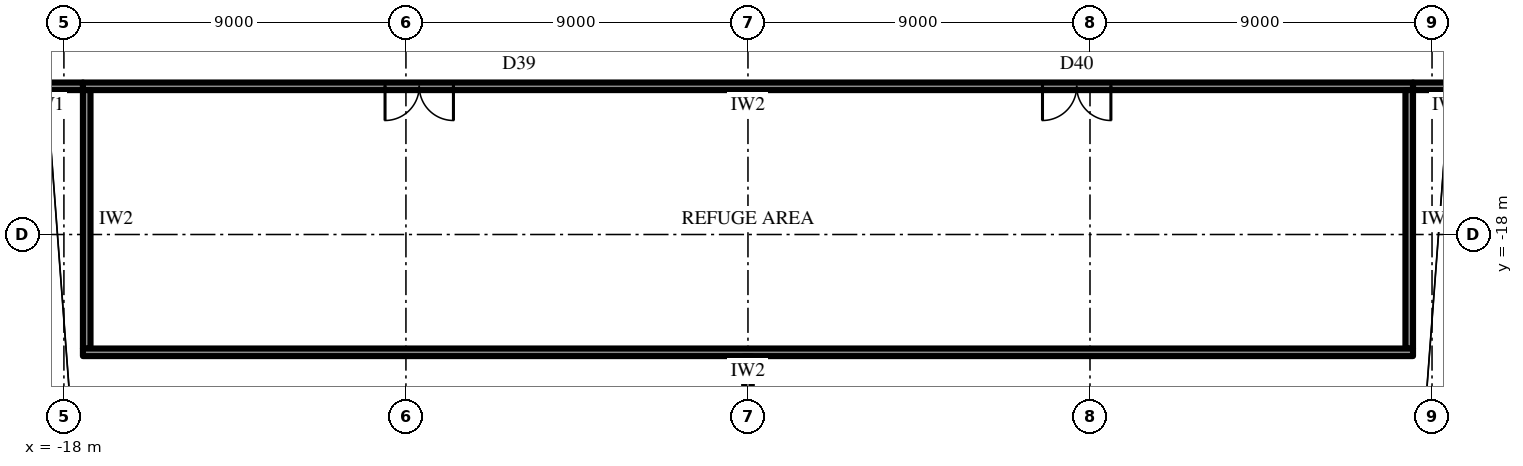
"""IFC4 building model, lengths in metres.
Left out: names, types, materials, properties, quantities, classifications, styles, units other than length and angle.
Written with IfcOpenShell. Run it as: python <this file> out.ifc"""

import sys

from ifc_helpers import new_model, si_unit, direction, frame, frame_2d, origin, place, context, subcontext, project, spatial, rectangle, extrude, element, fill, save


model = new_model("IFC4")
c1 = context("Model", 3, precision=1e-05, world=origin(), true_north=direction((0.0, 1.0)))
c2 = subcontext(c1, "Body", "Model", "MODEL_VIEW")
j1 = project(units=[si_unit("LENGTHUNIT", "METRE"), si_unit("PLANEANGLEUNIT", "RADIAN")], contexts=[c1])
p1 = place(None, origin())
s1 = spatial("IfcSite", under=j1, at=p1, CompositionType="ELEMENT")
p2 = place(p1, origin())
s2 = spatial("IfcBuilding", under=s1, at=p2, CompositionType="ELEMENT")
p3 = place(p2, frame((0.0, 0.0, 203.5)))
s3 = spatial("IfcBuildingStorey", under=s2, at=p3, CompositionType="ELEMENT", Elevation=203.5)
p4 = place(p3, frame((17.5, -14.1, 0.0), z_axis=(0.0, 0.0, 1.0), x_axis=(-1.0, 0.0, 0.0)))
e1 = element("IfcWall", 1, at=p4, inside=s3, PredefinedType="PARTITIONING", context=c2, shape_type="SweptSolid", body=[
    extrude(rectangle(XDim=35.0, YDim=0.2, at=frame_2d((17.5, 0.0))), origin(), (0.0, 0.0, 1.0), 6.7),
])
p5 = place(p4, frame((25.25, 0.0, 0.0)))
e2 = element("IfcOpeningElement", 2, at=p5, cuts=e1, PredefinedType="OPENING", context=c2, shape_type="SweptSolid", body=[
    extrude(rectangle(XDim=1.8, YDim=2.2, at=frame_2d((0.9, 1.1))), frame((0.0, 0.11, 0.0), z_axis=(0.0, -1.0, 0.0), x_axis=(1.0, 0.0, 0.0)), (0.0, 0.0, 1.0), 0.22),
])
p6 = place(p4, frame((7.95, 0.0, 0.0)))
e3 = element("IfcOpeningElement", 3, at=p6, cuts=e1, PredefinedType="OPENING", context=c2, shape_type="SweptSolid", body=[
    extrude(rectangle(XDim=1.8, YDim=2.2, at=frame_2d((0.9, 1.1))), frame((0.0, 0.11, 0.0), z_axis=(0.0, -1.0, 0.0), x_axis=(1.0, 0.0, 0.0)), (0.0, 0.0, 1.0), 0.22),
])
for number, where, z_axis, x_axis in (
    (4, (17.4, -14.2, 0.0), (0.0, 0.0, 1.0), (0.0, -1.0, 0.0)),
    (5, (-17.4, -14.2, 0.0), (0.0, 0.0, 1.0), (0.0, -1.0, 0.0)),
):
    element("IfcWall", number, at=place(p3, frame(where, z_axis=z_axis, x_axis=x_axis)), inside=s3, PredefinedType="PARTITIONING", context=c2, shape_type="SweptSolid", body=[
        extrude(rectangle(XDim=6.8, YDim=0.2, at=frame_2d((3.4, 0.0))), origin(), (0.0, 0.0, 1.0), 6.7),
    ])
p7 = place(p3, frame((17.5, -21.1, 0.0), z_axis=(0.0, 0.0, 1.0), x_axis=(-1.0, 0.0, 0.0)))
e6 = element("IfcWall", 6, at=p7, inside=s3, PredefinedType="PARTITIONING", context=c2, shape_type="SweptSolid", body=[
    extrude(rectangle(XDim=35.0, YDim=0.2, at=frame_2d((17.5, 0.0))), origin(), (0.0, 0.0, 1.0), 6.7),
])
for number, where, z_axis, x_axis in (
    (7, (-17.5, -14.1, 0.0), (0.0, 0.0, 1.0), (-1.0, 0.0, 0.0)),
    (8, (19.4, -14.1, 0.0), (0.0, 0.0, 1.0), (-1.0, 0.0, 0.0)),
):
    element("IfcWall", number, at=place(p3, frame(where, z_axis=z_axis, x_axis=x_axis)), inside=s3, PredefinedType="PARTITIONING", context=c2, shape_type="SweptSolid", body=[
        extrude(rectangle(XDim=1.9, YDim=0.2, at=frame_2d((0.95, 0.0))), origin(), (0.0, 0.0, 1.0), 6.7),
    ])
p8 = place(p3, frame((0.0, -21.2, 0.0), z_axis=(0.0, 0.0, 1.0), x_axis=(0.0, -1.0, 0.0)))
e9 = element("IfcWall", 9, at=p8, inside=s3, PredefinedType="PARTITIONING", context=c2, shape_type="SweptSolid", body=[
    extrude(rectangle(XDim=10.11, YDim=0.2, at=frame_2d((5.055, 0.0))), origin(), (0.0, 0.0, 1.0), 2.3),
])
p9 = place(p5, origin())
e10 = element("IfcDoor", 10, at=p9, inside=s3, OperationType="DOUBLE_DOOR_SINGLE_SWING", PredefinedType="DOOR", context=c2, shape_type="SweptSolid", body=[
    extrude(rectangle(XDim=1.8, YDim=2.2, at=frame_2d((0.9, 1.1))), frame((0.0, 0.025, 0.0), z_axis=(0.0, -1.0, 0.0), x_axis=(1.0, 0.0, 0.0)), (0.0, 0.0, 1.0), 0.05),
])
fill(e2, e10)
p10 = place(p6, origin())
e11 = element("IfcDoor", 11, at=p10, inside=s3, OperationType="DOUBLE_DOOR_SINGLE_SWING", PredefinedType="DOOR", context=c2, shape_type="SweptSolid", body=[
    extrude(rectangle(XDim=1.8, YDim=2.2, at=frame_2d((0.9, 1.1))), frame((0.0, 0.025, 0.0), z_axis=(0.0, -1.0, 0.0), x_axis=(1.0, 0.0, 0.0)), (0.0, 0.0, 1.0), 0.05),
])
fill(e3, e11)
save(model, sys.argv[1])
